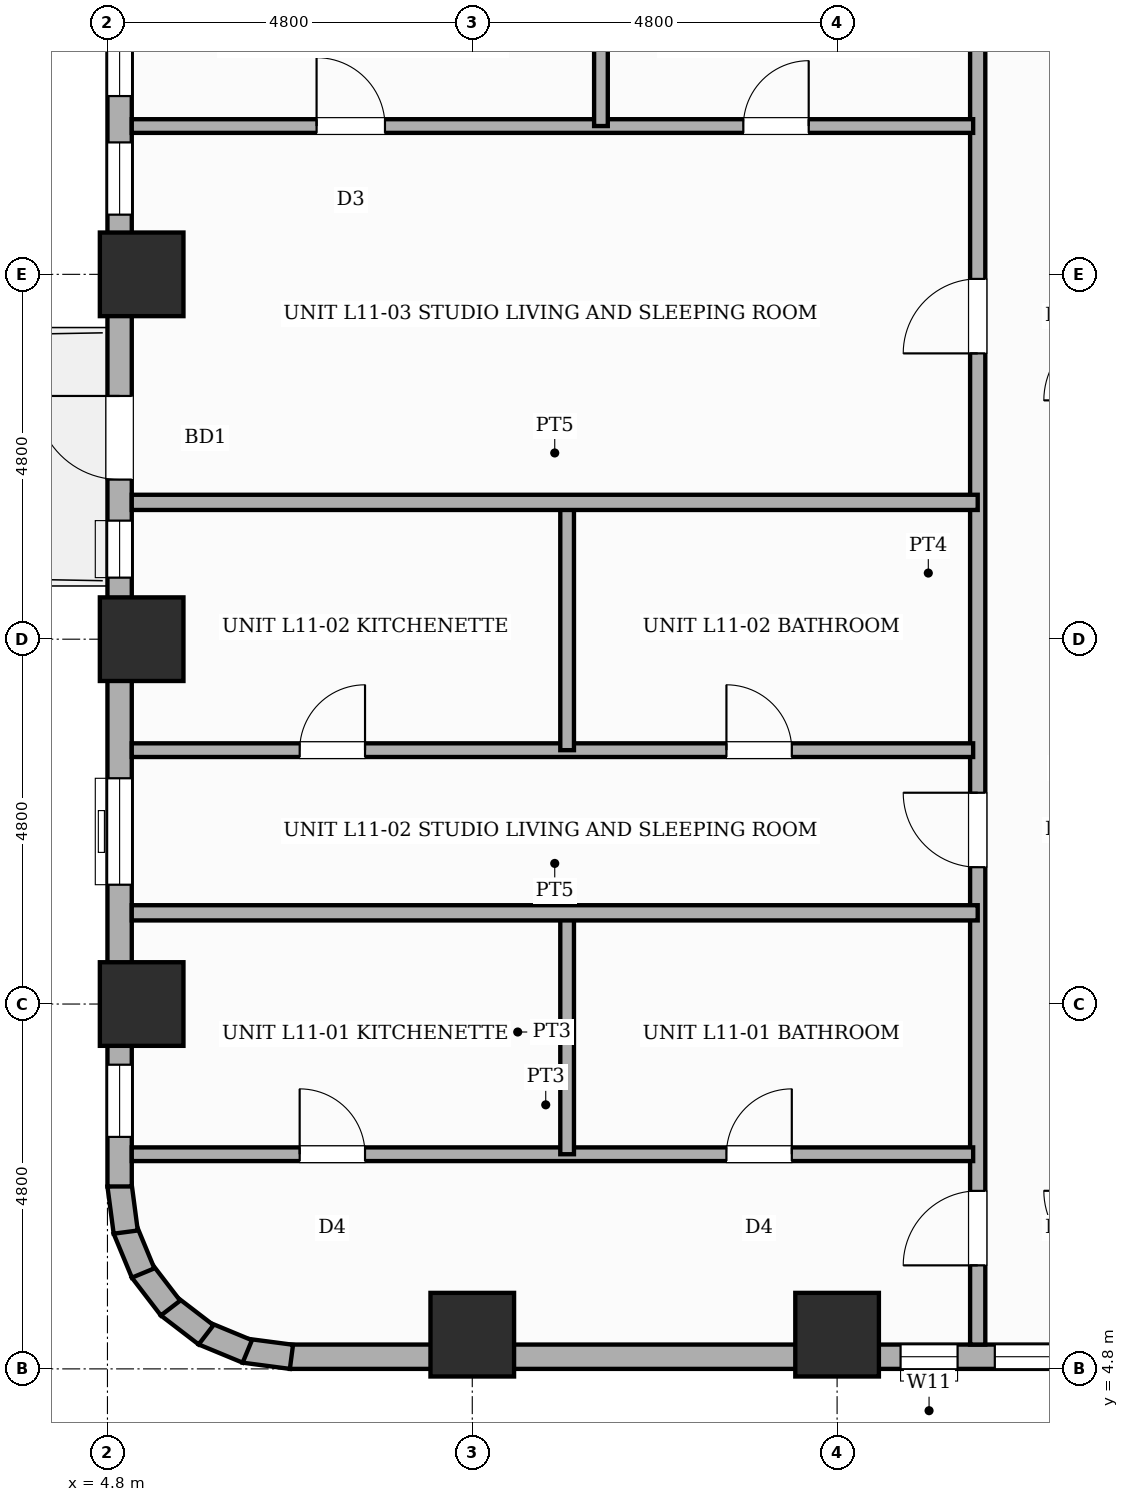
"""IFC4 building model, lengths in metres.
Left out: names, types, materials, properties, quantities, classifications, styles, units other than length and angle.
Written with IfcOpenShell. Run it as: python <this file> out.ifc"""

import sys

from ifc_helpers import new_model, si_unit, direction, frame, frame_2d, origin, origin_2d, place, context, subcontext, project, spatial, rectangle, extrude, element, fill, save


model = new_model("IFC4")
c1 = context("Model", 3, precision=1e-05, world=origin(), true_north=direction((0.0, 1.0)))
c2 = subcontext(c1, "Body", "Model", "MODEL_VIEW")
j1 = project(units=[si_unit("LENGTHUNIT", "METRE"), si_unit("PLANEANGLEUNIT", "RADIAN")], contexts=[c1])
p1 = place(None, origin())
s1 = spatial("IfcSite", under=j1, at=p1, CompositionType="ELEMENT")
p2 = place(p1, origin())
s2 = spatial("IfcBuilding", under=s1, at=p2, CompositionType="ELEMENT")
p3 = place(p2, frame((0.0, 0.0, 46.6)))
s3 = spatial("IfcBuildingStorey", under=s2, at=p3, CompositionType="ELEMENT", Elevation=46.6)
for number, where, z_axis, x_axis in (
    (1, (5.25, 9.6, 0.0), (0.0, 0.0, 1.0), (1.0, 0.0, 0.0)),
    (2, (5.25, 14.4, 0.0), (0.0, 0.0, 1.0), (1.0, 0.0, 0.0)),
    (3, (5.25, 19.2, 0.0), (0.0, 0.0, 1.0), (1.0, 0.0, 0.0)),
    (4, (9.6, 5.25, 0.0), (0.0, 0.0, 1.0), (1.0, 0.0, 0.0)),
    (5, (14.4, 5.25, 0.0), (0.0, 0.0, 1.0), (1.0, 0.0, 0.0)),
):
    element("IfcColumn", number, at=place(p3, frame(where, z_axis=z_axis, x_axis=x_axis)), inside=s3, PredefinedType="COLUMN", context=c2, shape_type="SweptSolid", body=[
        extrude(rectangle(XDim=1.1, YDim=1.1, at=origin_2d()), origin(), (0.0, 0.0, 1.0), 3.6),
    ])
p4 = place(p3, frame((21.6, 4.96, 0.0), z_axis=(0.0, 0.0, 1.0), x_axis=(-1.0, 0.0, 0.0)))
e6 = element("IfcWall", 6, at=p4, inside=s3, PredefinedType="STANDARD", context=c2, shape_type="SweptSolid", body=[
    extrude(rectangle(XDim=14.4, YDim=0.32, at=frame_2d((7.2, 0.0))), origin(), (0.0, 0.0, 1.0), 2.53),
])
p5 = place(p4, frame((5.615, 0.0, 0.45)))
e7 = element("IfcOpeningElement", 7, at=p5, cuts=e6, PredefinedType="OPENING", context=c2, shape_type="SweptSolid", body=[
    extrude(rectangle(XDim=0.75, YDim=1.8, at=frame_2d((0.375, 0.9))), frame((0.0, 0.17, 0.0), z_axis=(0.0, -1.0, 0.0), x_axis=(1.0, 0.0, 0.0)), (0.0, 0.0, 1.0), 0.34),
])
p6 = place(p4, frame((3.725, 0.0, 0.65)))
e8 = element("IfcOpeningElement", 8, at=p6, cuts=e6, PredefinedType="OPENING", context=c2, shape_type="SweptSolid", body=[
    extrude(rectangle(XDim=1.4, YDim=1.1, at=frame_2d((0.7, 0.55))), frame((0.0, 0.17, 0.0), z_axis=(0.0, -1.0, 0.0), x_axis=(1.0, 0.0, 0.0)), (0.0, 0.0, 1.0), 0.34),
])
p7 = place(p4, frame((0.47, 0.0, 0.45)))
e9 = element("IfcOpeningElement", 9, at=p7, cuts=e6, PredefinedType="OPENING", context=c2, shape_type="SweptSolid", body=[
    extrude(rectangle(XDim=0.95, YDim=1.8, at=frame_2d((0.475, 0.9))), frame((0.0, 0.17, 0.0), z_axis=(0.0, -1.0, 0.0), x_axis=(1.0, 0.0, 0.0)), (0.0, 0.0, 1.0), 0.34),
])
p8 = place(p3, frame((7.221, 4.958, 0.0), z_axis=(0.0, 0.0, 1.0), x_axis=(-0.991447664465, 0.130504898859, 0.0)))
e10 = element("IfcWall", 10, at=p8, inside=s3, PredefinedType="STANDARD", context=c2, shape_type="SweptSolid", body=[
    extrude(rectangle(XDim=0.627, YDim=0.32, at=frame_2d((0.313, 0.0))), origin(), (0.0, 0.0, 1.0), 3.35),
])
p9 = place(p3, frame((6.64, 5.03, 0.0), z_axis=(0.0, 0.0, 1.0), x_axis=(-0.923836271867, 0.382787856107, 0.0)))
e11 = element("IfcWall", 11, at=p9, inside=s3, PredefinedType="STANDARD", context=c2, shape_type="SweptSolid", body=[
    extrude(rectangle(XDim=0.626, YDim=0.32, at=frame_2d((0.313, 0.0))), origin(), (0.0, 0.0, 1.0), 3.35),
])
for number, where, z_axis, x_axis in (
    (12, (6.097, 5.248, 0.0), (0.0, 0.0, 1.0), (-0.793, 0.609, 0.0)),
    (13, (5.63, 5.6, 0.0), (0.0, 0.0, 1.0), (-0.609, 0.793, 0.0)),
):
    element("IfcWall", number, at=place(p3, frame(where, z_axis=z_axis, x_axis=x_axis)), inside=s3, PredefinedType="STANDARD", context=c2, shape_type="SweptSolid", body=[
        extrude(rectangle(XDim=0.627, YDim=0.32, at=frame_2d((0.313, 0.0))), origin(), (0.0, 0.0, 1.0), 3.35),
    ])
p10 = place(p3, frame((5.269, 6.061, 0.0), z_axis=(0.0, 0.0, 1.0), x_axis=(-0.382787856107, 0.923836271867, 0.0)))
e14 = element("IfcWall", 14, at=p10, inside=s3, PredefinedType="STANDARD", context=c2, shape_type="SweptSolid", body=[
    extrude(rectangle(XDim=0.626, YDim=0.32, at=frame_2d((0.313, 0.0))), origin(), (0.0, 0.0, 1.0), 3.35),
])
p11 = place(p3, frame((5.04, 6.6, 0.0), z_axis=(0.0, 0.0, 1.0), x_axis=(-0.130504898859, 0.991447664465, 0.0)))
e15 = element("IfcWall", 15, at=p11, inside=s3, PredefinedType="STANDARD", context=c2, shape_type="SweptSolid", body=[
    extrude(rectangle(XDim=0.627, YDim=0.32, at=frame_2d((0.313, 0.0))), origin(), (0.0, 0.0, 1.0), 3.35),
])
p12 = place(p3, frame((4.96, 7.2, 0.0), z_axis=(0.0, 0.0, 1.0), x_axis=(0.0, 1.0, 0.0)))
e16 = element("IfcWall", 16, at=p12, inside=s3, PredefinedType="STANDARD", context=c2, shape_type="SweptSolid", body=[
    extrude(rectangle(XDim=38.4, YDim=0.32, at=frame_2d((19.2, 0.0))), origin(), (0.0, 0.0, 1.0), 2.53),
])
p13 = place(p12, frame((9.3, 0.0, 0.0)))
e17 = element("IfcOpeningElement", 17, at=p13, cuts=e16, PredefinedType="OPENING", context=c2, shape_type="SweptSolid", body=[
    extrude(rectangle(XDim=1.1, YDim=2.15, at=frame_2d((0.55, 1.075))), frame((0.0, 0.17, 0.0), z_axis=(0.0, -1.0, 0.0), x_axis=(1.0, 0.0, 0.0)), (0.0, 0.0, 1.0), 0.34),
])
p14 = place(p12, frame((3.97, 0.0, 0.65)))
e18 = element("IfcOpeningElement", 18, at=p14, cuts=e16, PredefinedType="OPENING", context=c2, shape_type="SweptSolid", body=[
    extrude(rectangle(XDim=1.4, YDim=1.1, at=frame_2d((0.7, 0.55))), frame((0.0, 0.17, 0.0), z_axis=(0.0, -1.0, 0.0), x_axis=(1.0, 0.0, 0.0)), (0.0, 0.0, 1.0), 0.34),
])
p15 = place(p12, frame((12.785, 0.0, 0.45)))
e19 = element("IfcOpeningElement", 19, at=p15, cuts=e16, PredefinedType="OPENING", context=c2, shape_type="SweptSolid", body=[
    extrude(rectangle(XDim=0.95, YDim=1.8, at=frame_2d((0.475, 0.9))), frame((0.0, 0.17, 0.0), z_axis=(0.0, -1.0, 0.0), x_axis=(1.0, 0.0, 0.0)), (0.0, 0.0, 1.0), 0.34),
])
p16 = place(p12, frame((0.652, 0.0, 0.45)))
e20 = element("IfcOpeningElement", 20, at=p16, cuts=e16, PredefinedType="OPENING", context=c2, shape_type="SweptSolid", body=[
    extrude(rectangle(XDim=0.95, YDim=1.8, at=frame_2d((0.475, 0.9))), frame((0.0, 0.17, 0.0), z_axis=(0.0, -1.0, 0.0), x_axis=(1.0, 0.0, 0.0)), (0.0, 0.0, 1.0), 0.34),
])
p17 = place(p12, frame((8.01, 0.0, 0.45)))
e21 = element("IfcOpeningElement", 21, at=p17, cuts=e16, PredefinedType="OPENING", context=c2, shape_type="SweptSolid", body=[
    extrude(rectangle(XDim=0.75, YDim=1.8, at=frame_2d((0.375, 0.9))), frame((0.0, 0.17, 0.0), z_axis=(0.0, -1.0, 0.0), x_axis=(1.0, 0.0, 0.0)), (0.0, 0.0, 1.0), 0.34),
])
p18 = place(p12, frame((14.345, 0.0, 0.65)))
e22 = element("IfcOpeningElement", 22, at=p18, cuts=e16, PredefinedType="OPENING", context=c2, shape_type="SweptSolid", body=[
    extrude(rectangle(XDim=1.4, YDim=1.1, at=frame_2d((0.7, 0.55))), frame((0.0, 0.17, 0.0), z_axis=(0.0, -1.0, 0.0), x_axis=(1.0, 0.0, 0.0)), (0.0, 0.0, 1.0), 0.34),
])
p19 = place(p12, frame((17.58, 0.0, 0.45)))
e23 = element("IfcOpeningElement", 23, at=p19, cuts=e16, PredefinedType="OPENING", context=c2, shape_type="SweptSolid", body=[
    extrude(rectangle(XDim=0.75, YDim=1.8, at=frame_2d((0.375, 0.9))), frame((0.0, 0.17, 0.0), z_axis=(0.0, -1.0, 0.0), x_axis=(1.0, 0.0, 0.0)), (0.0, 0.0, 1.0), 0.34),
])
p20 = place(p3, frame((16.25, 5.12, 0.0), z_axis=(0.0, 0.0, 1.0), x_axis=(0.0, 1.0, 0.0)))
e24 = element("IfcWall", 24, at=p20, inside=s3, PredefinedType="PARTITIONING", context=c2, shape_type="SweptSolid", body=[
    extrude(rectangle(XDim=18.28, YDim=0.2, at=frame_2d((9.14, 0.0))), origin(), (0.0, 0.0, 1.0), 3.35),
])
p21 = place(p20, frame((1.042, 0.0, 0.0)))
e25 = element("IfcOpeningElement", 25, at=p21, cuts=e24, PredefinedType="OPENING", context=c2, shape_type="SweptSolid", body=[
    extrude(rectangle(XDim=0.98, YDim=2.18, at=frame_2d((0.49, 1.09))), frame((0.0, 0.11, 0.0), z_axis=(0.0, -1.0, 0.0), x_axis=(1.0, 0.0, 0.0)), (0.0, 0.0, 1.0), 0.22),
])
p22 = place(p20, frame((6.28, 0.0, 0.0)))
e26 = element("IfcOpeningElement", 26, at=p22, cuts=e24, PredefinedType="OPENING", context=c2, shape_type="SweptSolid", body=[
    extrude(rectangle(XDim=0.98, YDim=2.18, at=frame_2d((0.49, 1.09))), frame((0.0, 0.11, 0.0), z_axis=(0.0, -1.0, 0.0), x_axis=(1.0, 0.0, 0.0)), (0.0, 0.0, 1.0), 0.22),
])
p23 = place(p20, frame((13.04, 0.0, 0.0)))
e27 = element("IfcOpeningElement", 27, at=p23, cuts=e24, PredefinedType="OPENING", context=c2, shape_type="SweptSolid", body=[
    extrude(rectangle(XDim=0.98, YDim=2.18, at=frame_2d((0.49, 1.09))), frame((0.0, 0.11, 0.0), z_axis=(0.0, -1.0, 0.0), x_axis=(1.0, 0.0, 0.0)), (0.0, 0.0, 1.0), 0.22),
])
p24 = place(p3, frame((5.12, 7.624, 0.0), z_axis=(0.0, 0.0, 1.0), x_axis=(1.0, 0.0, 0.0)))
e28 = element("IfcWall", 28, at=p24, inside=s3, PredefinedType="PLUMBINGWALL", context=c2, shape_type="SweptSolid", body=[
    extrude(rectangle(XDim=11.07, YDim=0.18, at=frame_2d((5.535, 0.0))), origin(), (0.0, 0.0, 1.0), 3.35),
])
p25 = place(p24, frame((2.209, 0.0, 0.0)))
e29 = element("IfcOpeningElement", 29, at=p25, cuts=e28, PredefinedType="OPENING", context=c2, shape_type="SweptSolid", body=[
    extrude(rectangle(XDim=0.86, YDim=2.1, at=frame_2d((0.43, 1.05))), frame((0.0, 0.1, 0.0), z_axis=(0.0, -1.0, 0.0), x_axis=(1.0, 0.0, 0.0)), (0.0, 0.0, 1.0), 0.2),
])
p26 = place(p24, frame((7.824, 0.0, 0.0)))
e30 = element("IfcOpeningElement", 30, at=p26, cuts=e28, PredefinedType="OPENING", context=c2, shape_type="SweptSolid", body=[
    extrude(rectangle(XDim=0.86, YDim=2.1, at=frame_2d((0.43, 1.05))), frame((0.0, 0.1, 0.0), z_axis=(0.0, -1.0, 0.0), x_axis=(1.0, 0.0, 0.0)), (0.0, 0.0, 1.0), 0.2),
])
p27 = place(p3, frame((10.848, 7.624, 0.0), z_axis=(0.0, 0.0, 1.0), x_axis=(0.0, 1.0, 0.0)))
e31 = element("IfcWall", 31, at=p27, inside=s3, PredefinedType="PLUMBINGWALL", context=c2, shape_type="SweptSolid", body=[
    extrude(rectangle(XDim=3.216, YDim=0.18, at=frame_2d((1.608, 0.0))), origin(), (0.0, 0.0, 1.0), 3.35),
])
p28 = place(p3, frame((5.12, 10.8, 0.0), z_axis=(0.0, 0.0, 1.0), x_axis=(1.0, 0.0, 0.0)))
e32 = element("IfcWall", 32, at=p28, inside=s3, PredefinedType="SOLIDWALL", context=c2, shape_type="SweptSolid", body=[
    extrude(rectangle(XDim=11.13, YDim=0.2, at=frame_2d((5.565, 0.0))), origin(), (0.0, 0.0, 1.0), 3.35),
])
p29 = place(p3, frame((5.12, 12.94, 0.0), z_axis=(0.0, 0.0, 1.0), x_axis=(1.0, 0.0, 0.0)))
e33 = element("IfcWall", 33, at=p29, inside=s3, PredefinedType="PLUMBINGWALL", context=c2, shape_type="SweptSolid", body=[
    extrude(rectangle(XDim=11.07, YDim=0.18, at=frame_2d((5.535, 0.0))), origin(), (0.0, 0.0, 1.0), 3.35),
])
p30 = place(p29, frame((2.209, 0.0, 0.0)))
e34 = element("IfcOpeningElement", 34, at=p30, cuts=e33, PredefinedType="OPENING", context=c2, shape_type="SweptSolid", body=[
    extrude(rectangle(XDim=0.86, YDim=2.1, at=frame_2d((0.43, 1.05))), frame((0.0, 0.1, 0.0), z_axis=(0.0, -1.0, 0.0), x_axis=(1.0, 0.0, 0.0)), (0.0, 0.0, 1.0), 0.2),
])
p31 = place(p29, frame((7.824, 0.0, 0.0)))
e35 = element("IfcOpeningElement", 35, at=p31, cuts=e33, PredefinedType="OPENING", context=c2, shape_type="SweptSolid", body=[
    extrude(rectangle(XDim=0.86, YDim=2.1, at=frame_2d((0.43, 1.05))), frame((0.0, 0.1, 0.0), z_axis=(0.0, -1.0, 0.0), x_axis=(1.0, 0.0, 0.0)), (0.0, 0.0, 1.0), 0.2),
])
p32 = place(p3, frame((10.848, 12.94, 0.0), z_axis=(0.0, 0.0, 1.0), x_axis=(0.0, 1.0, 0.0)))
e36 = element("IfcWall", 36, at=p32, inside=s3, PredefinedType="PLUMBINGWALL", context=c2, shape_type="SweptSolid", body=[
    extrude(rectangle(XDim=3.3, YDim=0.18, at=frame_2d((1.65, 0.0))), origin(), (0.0, 0.0, 1.0), 3.35),
])
p33 = place(p3, frame((5.12, 16.2, 0.0), z_axis=(0.0, 0.0, 1.0), x_axis=(1.0, 0.0, 0.0)))
e37 = element("IfcWall", 37, at=p33, inside=s3, PredefinedType="SOLIDWALL", context=c2, shape_type="SweptSolid", body=[
    extrude(rectangle(XDim=11.13, YDim=0.2, at=frame_2d((5.565, 0.0))), origin(), (0.0, 0.0, 1.0), 3.35),
])
p34 = place(p3, frame((5.12, 21.151, 0.0), z_axis=(0.0, 0.0, 1.0), x_axis=(1.0, 0.0, 0.0)))
e38 = element("IfcWall", 38, at=p34, inside=s3, PredefinedType="PLUMBINGWALL", context=c2, shape_type="SweptSolid", body=[
    extrude(rectangle(XDim=11.07, YDim=0.18, at=frame_2d((5.535, 0.0))), origin(), (0.0, 0.0, 1.0), 3.35),
])
p35 = place(p34, frame((2.431, 0.0, 0.0)))
e39 = element("IfcOpeningElement", 39, at=p35, cuts=e38, PredefinedType="OPENING", context=c2, shape_type="SweptSolid", body=[
    extrude(rectangle(XDim=0.9, YDim=2.15, at=frame_2d((0.45, 1.075))), frame((0.0, 0.1, 0.0), z_axis=(0.0, -1.0, 0.0), x_axis=(1.0, 0.0, 0.0)), (0.0, 0.0, 1.0), 0.2),
])
p36 = place(p34, frame((8.046, 0.0, 0.0)))
e40 = element("IfcOpeningElement", 40, at=p36, cuts=e38, PredefinedType="OPENING", context=c2, shape_type="SweptSolid", body=[
    extrude(rectangle(XDim=0.86, YDim=2.1, at=frame_2d((0.43, 1.05))), frame((0.0, 0.1, 0.0), z_axis=(0.0, -1.0, 0.0), x_axis=(1.0, 0.0, 0.0)), (0.0, 0.0, 1.0), 0.2),
])
p37 = place(p3, frame((11.293, 21.151, 0.0), z_axis=(0.0, 0.0, 1.0), x_axis=(0.0, 1.0, 0.0)))
e41 = element("IfcWall", 41, at=p37, inside=s3, PredefinedType="PLUMBINGWALL", context=c2, shape_type="SweptSolid", body=[
    extrude(rectangle(XDim=2.189, YDim=0.18, at=frame_2d((1.095, 0.0))), origin(), (0.0, 0.0, 1.0), 3.35),
])
p38 = place(p5, origin())
e42 = element("IfcWindow", 42, at=p38, inside=s3, PartitioningType="SINGLE_PANEL", PredefinedType="WINDOW", context=c2, shape_type="SweptSolid", body=[
    extrude(rectangle(XDim=0.75, YDim=1.8, at=frame_2d((0.375, 0.9))), frame((0.0, 0.03, 0.0), z_axis=(0.0, -1.0, 0.0), x_axis=(1.0, 0.0, 0.0)), (0.0, 0.0, 1.0), 0.06),
])
fill(e7, e42)
p39 = place(p6, origin())
e43 = element("IfcWindow", 43, at=p39, inside=s3, PartitioningType="SINGLE_PANEL", PredefinedType="WINDOW", context=c2, shape_type="SweptSolid", body=[
    extrude(rectangle(XDim=1.4, YDim=1.1, at=frame_2d((0.7, 0.55))), frame((0.0, 0.03, 0.0), z_axis=(0.0, -1.0, 0.0), x_axis=(1.0, 0.0, 0.0)), (0.0, 0.0, 1.0), 0.06),
])
fill(e8, e43)
p40 = place(p13, origin())
e44 = element("IfcDoor", 44, at=p40, inside=s3, OperationType="SINGLE_SWING_RIGHT", PredefinedType="DOOR", context=c2, shape_type="SweptSolid", body=[
    extrude(rectangle(XDim=1.1, YDim=2.15, at=frame_2d((0.55, 1.075))), frame((0.0, 0.025, 0.0), z_axis=(0.0, -1.0, 0.0), x_axis=(1.0, 0.0, 0.0)), (0.0, 0.0, 1.0), 0.05),
])
fill(e17, e44)
p41 = place(p14, origin())
e45 = element("IfcWindow", 45, at=p41, inside=s3, PartitioningType="SINGLE_PANEL", PredefinedType="WINDOW", context=c2, shape_type="SweptSolid", body=[
    extrude(rectangle(XDim=1.4, YDim=1.1, at=frame_2d((0.7, 0.55))), frame((0.0, 0.03, 0.0), z_axis=(0.0, -1.0, 0.0), x_axis=(1.0, 0.0, 0.0)), (0.0, 0.0, 1.0), 0.06),
])
fill(e18, e45)
p42 = place(p15, origin())
e46 = element("IfcWindow", 46, at=p42, inside=s3, PartitioningType="SINGLE_PANEL", PredefinedType="WINDOW", context=c2, shape_type="SweptSolid", body=[
    extrude(rectangle(XDim=0.95, YDim=1.8, at=frame_2d((0.475, 0.9))), frame((0.0, 0.03, 0.0), z_axis=(0.0, -1.0, 0.0), x_axis=(1.0, 0.0, 0.0)), (0.0, 0.0, 1.0), 0.06),
])
fill(e19, e46)
p43 = place(p16, origin())
e47 = element("IfcWindow", 47, at=p43, inside=s3, PartitioningType="SINGLE_PANEL", PredefinedType="WINDOW", context=c2, shape_type="SweptSolid", body=[
    extrude(rectangle(XDim=0.95, YDim=1.8, at=frame_2d((0.475, 0.9))), frame((0.0, 0.03, 0.0), z_axis=(0.0, -1.0, 0.0), x_axis=(1.0, 0.0, 0.0)), (0.0, 0.0, 1.0), 0.06),
])
fill(e20, e47)
p44 = place(p17, origin())
e48 = element("IfcWindow", 48, at=p44, inside=s3, PartitioningType="SINGLE_PANEL", PredefinedType="WINDOW", context=c2, shape_type="SweptSolid", body=[
    extrude(rectangle(XDim=0.75, YDim=1.8, at=frame_2d((0.375, 0.9))), frame((0.0, 0.03, 0.0), z_axis=(0.0, -1.0, 0.0), x_axis=(1.0, 0.0, 0.0)), (0.0, 0.0, 1.0), 0.06),
])
fill(e21, e48)
p45 = place(p18, origin())
e49 = element("IfcWindow", 49, at=p45, inside=s3, PartitioningType="SINGLE_PANEL", PredefinedType="WINDOW", context=c2, shape_type="SweptSolid", body=[
    extrude(rectangle(XDim=1.4, YDim=1.1, at=frame_2d((0.7, 0.55))), frame((0.0, 0.03, 0.0), z_axis=(0.0, -1.0, 0.0), x_axis=(1.0, 0.0, 0.0)), (0.0, 0.0, 1.0), 0.06),
])
fill(e22, e49)
p46 = place(p21, origin())
e50 = element("IfcDoor", 50, at=p46, inside=s3, OperationType="SINGLE_SWING_LEFT", PredefinedType="DOOR", context=c2, shape_type="SweptSolid", body=[
    extrude(rectangle(XDim=0.98, YDim=2.18, at=frame_2d((0.49, 1.09))), frame((0.0, 0.025, 0.0), z_axis=(0.0, -1.0, 0.0), x_axis=(1.0, 0.0, 0.0)), (0.0, 0.0, 1.0), 0.05),
])
fill(e25, e50)
p47 = place(p25, origin())
e51 = element("IfcDoor", 51, at=p47, inside=s3, OperationType="SINGLE_SWING_LEFT", PredefinedType="DOOR", context=c2, shape_type="SweptSolid", body=[
    extrude(rectangle(XDim=0.86, YDim=2.1, at=frame_2d((0.43, 1.05))), frame((0.0, 0.025, 0.0), z_axis=(0.0, -1.0, 0.0), x_axis=(1.0, 0.0, 0.0)), (0.0, 0.0, 1.0), 0.05),
])
fill(e29, e51)
p48 = place(p26, origin())
e52 = element("IfcDoor", 52, at=p48, inside=s3, OperationType="SINGLE_SWING_RIGHT", PredefinedType="DOOR", context=c2, shape_type="SweptSolid", body=[
    extrude(rectangle(XDim=0.86, YDim=2.1, at=frame_2d((0.43, 1.05))), frame((0.0, 0.025, 0.0), z_axis=(0.0, -1.0, 0.0), x_axis=(1.0, 0.0, 0.0)), (0.0, 0.0, 1.0), 0.05),
])
fill(e30, e52)
p49 = place(p22, origin())
e53 = element("IfcDoor", 53, at=p49, inside=s3, OperationType="SINGLE_SWING_RIGHT", PredefinedType="DOOR", context=c2, shape_type="SweptSolid", body=[
    extrude(rectangle(XDim=0.98, YDim=2.18, at=frame_2d((0.49, 1.09))), frame((0.0, 0.025, 0.0), z_axis=(0.0, -1.0, 0.0), x_axis=(1.0, 0.0, 0.0)), (0.0, 0.0, 1.0), 0.05),
])
fill(e26, e53)
p50 = place(p30, origin())
e54 = element("IfcDoor", 54, at=p50, inside=s3, OperationType="SINGLE_SWING_RIGHT", PredefinedType="DOOR", context=c2, shape_type="SweptSolid", body=[
    extrude(rectangle(XDim=0.86, YDim=2.1, at=frame_2d((0.43, 1.05))), frame((0.0, 0.025, 0.0), z_axis=(0.0, -1.0, 0.0), x_axis=(1.0, 0.0, 0.0)), (0.0, 0.0, 1.0), 0.05),
])
fill(e34, e54)
p51 = place(p31, origin())
e55 = element("IfcDoor", 55, at=p51, inside=s3, OperationType="SINGLE_SWING_LEFT", PredefinedType="DOOR", context=c2, shape_type="SweptSolid", body=[
    extrude(rectangle(XDim=0.86, YDim=2.1, at=frame_2d((0.43, 1.05))), frame((0.0, 0.025, 0.0), z_axis=(0.0, -1.0, 0.0), x_axis=(1.0, 0.0, 0.0)), (0.0, 0.0, 1.0), 0.05),
])
fill(e35, e55)
p52 = place(p23, origin())
e56 = element("IfcDoor", 56, at=p52, inside=s3, OperationType="SINGLE_SWING_LEFT", PredefinedType="DOOR", context=c2, shape_type="SweptSolid", body=[
    extrude(rectangle(XDim=0.98, YDim=2.18, at=frame_2d((0.49, 1.09))), frame((0.0, 0.025, 0.0), z_axis=(0.0, -1.0, 0.0), x_axis=(1.0, 0.0, 0.0)), (0.0, 0.0, 1.0), 0.05),
])
fill(e27, e56)
p53 = place(p35, origin())
e57 = element("IfcDoor", 57, at=p53, inside=s3, OperationType="SINGLE_SWING_LEFT", PredefinedType="DOOR", context=c2, shape_type="SweptSolid", body=[
    extrude(rectangle(XDim=0.9, YDim=2.15, at=frame_2d((0.45, 1.075))), frame((0.0, 0.025, 0.0), z_axis=(0.0, -1.0, 0.0), x_axis=(1.0, 0.0, 0.0)), (0.0, 0.0, 1.0), 0.05),
])
fill(e39, e57)
p54 = place(p36, origin())
e58 = element("IfcDoor", 58, at=p54, inside=s3, OperationType="SINGLE_SWING_RIGHT", PredefinedType="DOOR", context=c2, shape_type="SweptSolid", body=[
    extrude(rectangle(XDim=0.86, YDim=2.1, at=frame_2d((0.43, 1.05))), frame((0.0, 0.025, 0.0), z_axis=(0.0, -1.0, 0.0), x_axis=(1.0, 0.0, 0.0)), (0.0, 0.0, 1.0), 0.05),
])
fill(e40, e58)
save(model, sys.argv[1])
